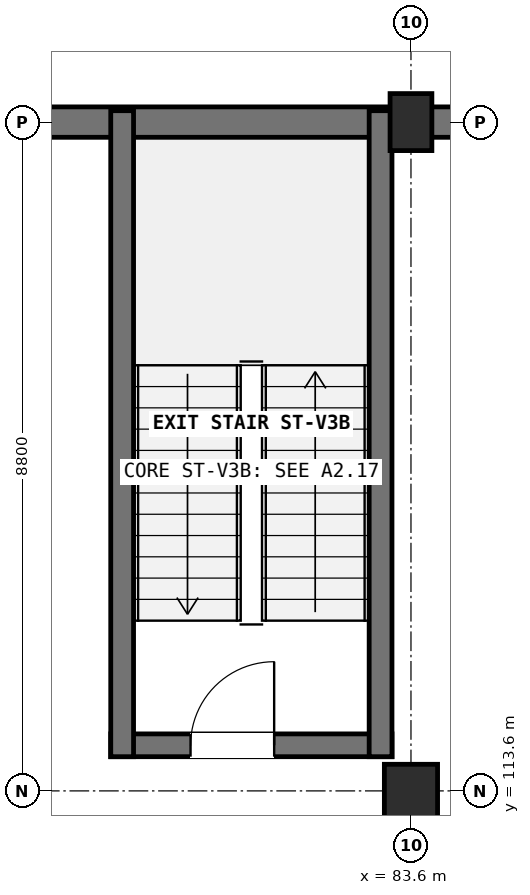
"""IFC4 building model, lengths in metres.
Left out: names, types, materials, properties, quantities, classifications, styles, units other than length and angle.
Written with IfcOpenShell. Run it as: python <this file> out.ifc"""

import sys

from ifc_helpers import new_model, si_unit, direction, frame, frame_2d, origin, origin_2d, place, context, subcontext, project, spatial, rectangle, extrude, element, fill, save


model = new_model("IFC4")
c1 = context("Model", 3, precision=1e-05, world=origin(), true_north=direction((0.0, 1.0)))
c2 = subcontext(c1, "Body", "Model", "MODEL_VIEW")
j1 = project(units=[si_unit("LENGTHUNIT", "METRE"), si_unit("PLANEANGLEUNIT", "RADIAN")], contexts=[c1])
p1 = place(None, origin())
s1 = spatial("IfcSite", under=j1, at=p1, CompositionType="ELEMENT")
p2 = place(p1, origin())
s2 = spatial("IfcBuilding", under=s1, at=p2, CompositionType="ELEMENT")
p3 = place(p2, frame((0.0, 0.0, -4.5)))
s3 = spatial("IfcBuildingStorey", under=s2, at=p3, CompositionType="ELEMENT", Elevation=-4.5)
p4 = place(p3, frame((83.6, 113.6, 0.0), z_axis=(0.0, 0.0, 1.0), x_axis=(1.0, 0.0, 0.0)))
e1 = element("IfcColumn", 1, at=p4, inside=s3, PredefinedType="COLUMN", context=c2, shape_type="SweptSolid", body=[
    extrude(rectangle(XDim=0.7, YDim=0.7, at=origin_2d()), origin(), (0.0, 0.0, 1.0), 4.5),
])
p5 = place(p3, frame((83.6, 122.4, 0.0), z_axis=(0.0, 0.0, 1.0), x_axis=(1.0, 0.0, 0.0)))
e2 = element("IfcColumn", 2, at=p5, inside=s3, PredefinedType="COLUMN", context=c2, shape_type="SweptSolid", body=[
    extrude(rectangle(XDim=0.55, YDim=0.75, at=origin_2d()), origin(), (0.0, 0.0, 1.0), 4.5),
])
p6 = place(p3, frame((176.2, 122.4, 0.0), z_axis=(0.0, 0.0, 1.0), x_axis=(-1.0, 0.0, 0.0)))
e3 = element("IfcWall", 3, at=p6, inside=s3, PredefinedType="USERDEFINED", context=c2, shape_type="SweptSolid", body=[
    extrude(rectangle(XDim=168.4, YDim=0.4, at=frame_2d((84.2, 0.0))), origin(), (0.0, 0.0, 1.0), 4.5),
])
p7 = place(p3, frame((79.65, 114.2, 0.0), z_axis=(0.0, 0.0, 1.0), x_axis=(1.0, 0.0, 0.0)))
e4 = element("IfcWall", 4, at=p7, inside=s3, PredefinedType="SHEAR", context=c2, shape_type="SweptSolid", body=[
    extrude(rectangle(XDim=3.7, YDim=0.3, at=frame_2d((1.85, 0.0))), origin(), (0.0, 0.0, 1.0), 4.5),
])
p8 = place(p7, frame((1.05, 0.0, 0.0)))
e5 = element("IfcOpeningElement", 5, at=p8, cuts=e4, PredefinedType="OPENING", context=c2, shape_type="SweptSolid", body=[
    extrude(rectangle(XDim=1.1, YDim=2.2, at=frame_2d((0.55, 1.1))), frame((0.0, 0.16, 0.0), z_axis=(0.0, -1.0, 0.0), x_axis=(1.0, 0.0, 0.0)), (0.0, 0.0, 1.0), 0.32),
])
for number, where, z_axis, x_axis in (
    (6, (79.8, 114.05, 0.0), (0.0, 0.0, 1.0), (0.0, 1.0, 0.0)),
    (7, (83.2, 114.05, 0.0), (0.0, 0.0, 1.0), (0.0, 1.0, 0.0)),
):
    element("IfcWall", number, at=place(p3, frame(where, z_axis=z_axis, x_axis=x_axis)), inside=s3, PredefinedType="SHEAR", context=c2, shape_type="SweptSolid", body=[
        extrude(rectangle(XDim=8.5, YDim=0.3, at=frame_2d((4.25, 0.0))), origin(), (0.0, 0.0, 1.0), 4.5),
    ])
p9 = place(p8, origin())
e8 = element("IfcDoor", 8, at=p9, inside=s3, OperationType="SINGLE_SWING_RIGHT", PredefinedType="DOOR", context=c2, shape_type="SweptSolid", body=[
    extrude(rectangle(XDim=1.1, YDim=2.2, at=frame_2d((0.55, 1.1))), frame((0.0, 0.025, 0.0), z_axis=(0.0, -1.0, 0.0), x_axis=(1.0, 0.0, 0.0)), (0.0, 0.0, 1.0), 0.05),
])
fill(e5, e8)
save(model, sys.argv[1])
